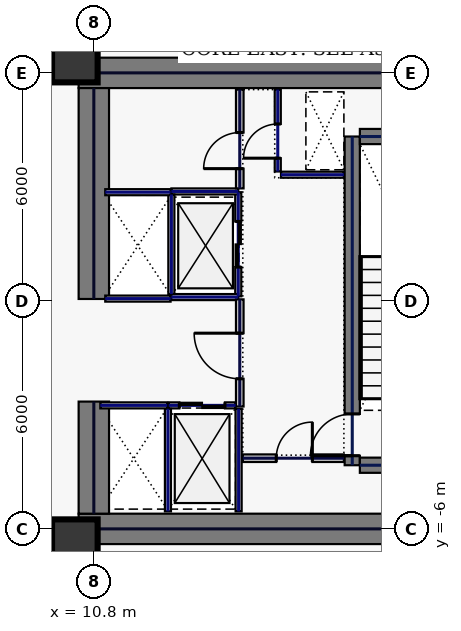
"""IFC4 building model, lengths in metres.
Left out: names, types, materials, properties, quantities, classifications, styles, units other than length and angle.
Written with IfcOpenShell. Run it as: python <this file> out.ifc"""

import sys

from ifc_helpers import new_model, si_unit, direction, frame, frame_2d, origin, origin_2d, place, context, subcontext, project, spatial, rectangle, hollow_rectangle, extrude, element, fill, save


model = new_model("IFC4")
c1 = context("Model", 3, precision=1e-05, world=origin(), true_north=direction((0.0, 1.0)))
c2 = subcontext(c1, "Body", "Model", "MODEL_VIEW")
j1 = project(units=[si_unit("LENGTHUNIT", "METRE"), si_unit("PLANEANGLEUNIT", "RADIAN")], contexts=[c1])
p1 = place(None, origin())
s1 = spatial("IfcSite", under=j1, at=p1, CompositionType="ELEMENT")
p2 = place(p1, origin())
s2 = spatial("IfcBuilding", under=s1, at=p2, CompositionType="ELEMENT")
p3 = place(p2, frame((0.0, 0.0, 55.4)))
s3 = spatial("IfcBuildingStorey", under=s2, at=p3, CompositionType="ELEMENT", Elevation=55.4)
for number, where, z_axis, x_axis in (
    (1, (10.4, 6.0, 0.0), (0.0, 0.0, 1.0), (1.0, 0.0, 0.0)),
    (2, (10.4, -6.0, 0.0), (0.0, 0.0, 1.0), (1.0, 0.0, 0.0)),
):
    element("IfcWall", number, at=place(p3, frame(where, z_axis=z_axis, x_axis=x_axis)), inside=s3, PredefinedType="SHEAR", context=c2, shape_type="SweptSolid", body=[
        extrude(rectangle(XDim=11.6, YDim=0.8, at=frame_2d((5.8, 0.0))), origin(), (0.0, 0.0, 1.0), 3.74),
    ])
p4 = place(p3, frame((10.8, -5.6, 0.0), z_axis=(0.0, 0.0, 1.0), x_axis=(0.0, 1.0, 0.0)))
e3 = element("IfcWall", 3, at=p4, inside=s3, PredefinedType="SHEAR", context=c2, shape_type="SweptSolid", body=[
    extrude(rectangle(XDim=2.95, YDim=0.8, at=frame_2d((1.475, 0.0))), origin(), (0.0, 0.0, 1.0), 3.74),
])
p5 = place(p3, frame((10.8, 0.05, 0.0), z_axis=(0.0, 0.0, 1.0), x_axis=(0.0, 1.0, 0.0)))
e4 = element("IfcWall", 4, at=p5, inside=s3, PredefinedType="SHEAR", context=c2, shape_type="SweptSolid", body=[
    extrude(rectangle(XDim=5.55, YDim=0.8, at=frame_2d((2.775, 0.0))), origin(), (0.0, 0.0, 1.0), 3.74),
])
p6 = place(p3, frame((17.6, -4.325, 0.0), z_axis=(0.0, 0.0, 1.0), x_axis=(0.0, 1.0, 0.0)))
e5 = element("IfcWall", 5, at=p6, inside=s3, PredefinedType="SHEAR", context=c2, shape_type="SweptSolid", body=[
    extrude(rectangle(XDim=8.65, YDim=0.4, at=frame_2d((4.325, 0.0))), origin(), (0.0, 0.0, 1.0), 3.74),
])
p7 = place(p6, frame((0.25, 0.0, 0.0)))
e6 = element("IfcOpeningElement", 6, at=p7, cuts=e5, PredefinedType="OPENING", context=c2, shape_type="SweptSolid", body=[
    extrude(rectangle(XDim=1.1, YDim=2.2, at=frame_2d((0.55, 1.1))), frame((0.0, 0.21, 0.0), z_axis=(0.0, -1.0, 0.0), x_axis=(1.0, 0.0, 0.0)), (0.0, 0.0, 1.0), 0.42),
])
for number, where, z_axis, x_axis in (
    (7, (17.8, -4.325, 0.0), (0.0, 0.0, 1.0), (1.0, 0.0, 0.0)),
    (8, (17.8, 4.325, 0.0), (0.0, 0.0, 1.0), (1.0, 0.0, 0.0)),
):
    element("IfcWall", number, at=place(p3, frame(where, z_axis=z_axis, x_axis=x_axis)), inside=s3, PredefinedType="SHEAR", context=c2, shape_type="SweptSolid", body=[
        extrude(rectangle(XDim=3.4, YDim=0.4, at=frame_2d((1.7, 0.0))), origin(), (0.0, 0.0, 1.0), 3.74),
    ])
for number, where, z_axis, x_axis in (
    (9, (10.3, -6.35, 0.0), (0.0, 0.0, 1.0), (1.0, 0.0, 0.0)),
    (10, (10.3, 6.35, 0.0), (0.0, 0.0, 1.0), (1.0, 0.0, 0.0)),
):
    element("IfcColumn", number, at=place(p3, frame(where, z_axis=z_axis, x_axis=x_axis)), inside=s3, PredefinedType="COLUMN", context=c2, shape_type="SweptSolid", body=[
        extrude(hollow_rectangle(XDim=1.2, YDim=1.2, WallThickness=0.05, at=origin_2d()), origin(), (0.0, 0.0, 1.0), 3.74),
    ])
p8 = place(p3, frame((14.6, 0.12, 0.0), z_axis=(0.0, 0.0, 1.0), x_axis=(0.0, 1.0, 0.0)))
e11 = element("IfcWall", 11, at=p8, inside=s3, PredefinedType="PARTITIONING", context=c2, shape_type="SweptSolid", body=[
    extrude(rectangle(XDim=2.74, YDim=0.16, at=frame_2d((1.37, 0.0))), origin(), (0.0, 0.0, 1.0), 3.74),
])
p9 = place(p8, frame((0.77, 0.0, 0.0)))
e12 = element("IfcOpeningElement", 12, at=p9, cuts=e11, PredefinedType="OPENING", context=c2, shape_type="SweptSolid", body=[
    extrude(rectangle(XDim=1.2, YDim=2.2, at=frame_2d((0.6, 1.1))), frame((0.0, 0.09, 0.0), z_axis=(0.0, -1.0, 0.0), x_axis=(1.0, 0.0, 0.0)), (0.0, 0.0, 1.0), 0.18),
])
for number, where, z_axis, x_axis in (
    (13, (12.84, 0.1, 0.0), (0.0, 0.0, 1.0), (1.0, 0.0, 0.0)),
    (14, (12.84, 2.88, 0.0), (0.0, 0.0, 1.0), (1.0, 0.0, 0.0)),
):
    element("IfcWall", number, at=place(p3, frame(where, z_axis=z_axis, x_axis=x_axis)), inside=s3, PredefinedType="PARTITIONING", context=c2, shape_type="SweptSolid", body=[
        extrude(rectangle(XDim=1.76, YDim=0.16, at=frame_2d((0.88, 0.0))), origin(), (0.0, 0.0, 1.0), 3.74),
    ])
p10 = place(p3, frame((12.84, 0.18, 0.0), z_axis=(0.0, 0.0, 1.0), x_axis=(0.0, 1.0, 0.0)))
e15 = element("IfcWall", 15, at=p10, inside=s3, PredefinedType="PARTITIONING", context=c2, shape_type="SweptSolid", body=[
    extrude(rectangle(XDim=2.62, YDim=0.16, at=frame_2d((1.31, 0.0))), origin(), (0.0, 0.0, 1.0), 3.74),
])
p11 = place(p3, frame((12.77, -2.75, 0.0), z_axis=(0.0, 0.0, 1.0), x_axis=(1.0, 0.0, 0.0)))
e16 = element("IfcWall", 16, at=p11, inside=s3, PredefinedType="PARTITIONING", context=c2, shape_type="SweptSolid", body=[
    extrude(rectangle(XDim=1.76, YDim=0.16, at=frame_2d((0.88, 0.0))), origin(), (0.0, 0.0, 1.0), 3.74),
])
p12 = place(p11, frame((0.28, 0.0, 0.0)))
e17 = element("IfcOpeningElement", 17, at=p12, cuts=e16, PredefinedType="OPENING", context=c2, shape_type="SweptSolid", body=[
    extrude(rectangle(XDim=1.2, YDim=2.2, at=frame_2d((0.6, 1.1))), frame((0.0, 0.09, 0.0), z_axis=(0.0, -1.0, 0.0), x_axis=(1.0, 0.0, 0.0)), (0.0, 0.0, 1.0), 0.18),
])
for number, where, z_axis, x_axis in (
    (18, (12.75, -5.54, 0.0), (0.0, 0.0, 1.0), (0.0, 1.0, 0.0)),
    (19, (14.61, -5.54, 0.0), (0.0, 0.0, 1.0), (0.0, 1.0, 0.0)),
):
    element("IfcWall", number, at=place(p3, frame(where, z_axis=z_axis, x_axis=x_axis)), inside=s3, PredefinedType="PARTITIONING", context=c2, shape_type="SweptSolid", body=[
        extrude(rectangle(XDim=2.7, YDim=0.16, at=frame_2d((1.35, 0.0))), origin(), (0.0, 0.0, 1.0), 3.74),
    ])
p13 = place(p3, frame((10.97, -2.75, 0.0), z_axis=(0.0, 0.0, 1.0), x_axis=(1.0, 0.0, 0.0)))
e20 = element("IfcWall", 20, at=p13, inside=s3, PredefinedType="PARTITIONING", context=c2, shape_type="SweptSolid", body=[
    extrude(rectangle(XDim=1.76, YDim=0.16, at=frame_2d((0.88, 0.0))), origin(), (0.0, 0.0, 1.0), 3.74),
])
for number, where, z_axis, x_axis in (
    (21, (11.1, 0.06, 0.0), (0.0, 0.0, 1.0), (1.0, 0.0, 0.0)),
    (22, (11.1, 2.86, 0.0), (0.0, 0.0, 1.0), (1.0, 0.0, 0.0)),
):
    element("IfcWall", number, at=place(p3, frame(where, z_axis=z_axis, x_axis=x_axis)), inside=s3, PredefinedType="PARTITIONING", context=c2, shape_type="SweptSolid", body=[
        extrude(rectangle(XDim=1.72, YDim=0.16, at=frame_2d((0.86, 0.0))), origin(), (0.0, 0.0, 1.0), 3.74),
    ])
p14 = place(p3, frame((15.64, 3.405, 0.0), z_axis=(0.0, 0.0, 1.0), x_axis=(0.0, 1.0, 0.0)))
e23 = element("IfcWall", 23, at=p14, inside=s3, PredefinedType="PARTITIONING", context=c2, shape_type="SweptSolid", body=[
    extrude(rectangle(XDim=2.155, YDim=0.16, at=frame_2d((1.078, 0.0))), origin(), (0.0, 0.0, 1.0), 3.74),
])
p15 = place(p14, frame((0.35, 0.0, 0.0)))
e24 = element("IfcOpeningElement", 24, at=p15, cuts=e23, PredefinedType="OPENING", context=c2, shape_type="SweptSolid", body=[
    extrude(rectangle(XDim=0.9, YDim=2.2, at=frame_2d((0.45, 1.1))), frame((0.0, 0.09, 0.0), z_axis=(0.0, -1.0, 0.0), x_axis=(1.0, 0.0, 0.0)), (0.0, 0.0, 1.0), 0.18),
])
p16 = place(p3, frame((15.725, 3.32, 0.0), z_axis=(0.0, 0.0, 1.0), x_axis=(1.0, 0.0, 0.0)))
e25 = element("IfcWall", 25, at=p16, inside=s3, PredefinedType="PARTITIONING", context=c2, shape_type="SweptSolid", body=[
    extrude(rectangle(XDim=1.655, YDim=0.16, at=frame_2d((0.827, 0.0))), origin(), (0.0, 0.0, 1.0), 3.74),
])
p17 = place(p3, frame((14.72, -4.14, 0.0), z_axis=(0.0, 0.0, 1.0), x_axis=(1.0, 0.0, 0.0)))
e26 = element("IfcWall", 26, at=p17, inside=s3, PredefinedType="SOLIDWALL", context=c2, shape_type="SweptSolid", body=[
    extrude(rectangle(XDim=2.66, YDim=0.2, at=frame_2d((1.33, 0.0))), origin(), (0.0, 0.0, 1.0), 3.74),
])
p18 = place(p17, frame((0.88, 0.0, 0.0)))
e27 = element("IfcOpeningElement", 27, at=p18, cuts=e26, PredefinedType="OPENING", context=c2, shape_type="SweptSolid", body=[
    extrude(rectangle(XDim=0.95, YDim=2.2, at=frame_2d((0.475, 1.1))), frame((0.0, 0.11, 0.0), z_axis=(0.0, -1.0, 0.0), x_axis=(1.0, 0.0, 0.0)), (0.0, 0.0, 1.0), 0.22),
])
p19 = place(p3, frame((14.64, 2.96, 0.0), z_axis=(0.0, 0.0, 1.0), x_axis=(0.0, 1.0, 0.0)))
e28 = element("IfcWall", 28, at=p19, inside=s3, PredefinedType="SOLIDWALL", context=c2, shape_type="SweptSolid", body=[
    extrude(rectangle(XDim=2.6, YDim=0.2, at=frame_2d((1.3, 0.0))), origin(), (0.0, 0.0, 1.0), 3.74),
])
p20 = place(p19, frame((0.52, 0.0, 0.0)))
e29 = element("IfcOpeningElement", 29, at=p20, cuts=e28, PredefinedType="OPENING", context=c2, shape_type="SweptSolid", body=[
    extrude(rectangle(XDim=0.95, YDim=2.2, at=frame_2d((0.475, 1.1))), frame((0.0, 0.11, 0.0), z_axis=(0.0, -1.0, 0.0), x_axis=(1.0, 0.0, 0.0)), (0.0, 0.0, 1.0), 0.22),
])
p21 = place(p3, frame((14.64, -2.78, 0.0), z_axis=(0.0, 0.0, 1.0), x_axis=(0.0, 1.0, 0.0)))
e30 = element("IfcWall", 30, at=p21, inside=s3, PredefinedType="SOLIDWALL", context=c2, shape_type="SweptSolid", body=[
    extrude(rectangle(XDim=2.82, YDim=0.2, at=frame_2d((1.41, 0.0))), origin(), (0.0, 0.0, 1.0), 3.74),
])
p22 = place(p21, frame((0.73, 0.0, 0.0)))
e31 = element("IfcOpeningElement", 31, at=p22, cuts=e30, PredefinedType="OPENING", context=c2, shape_type="SweptSolid", body=[
    extrude(rectangle(XDim=1.2, YDim=2.2, at=frame_2d((0.6, 1.1))), frame((0.0, 0.11, 0.0), z_axis=(0.0, -1.0, 0.0), x_axis=(1.0, 0.0, 0.0)), (0.0, 0.0, 1.0), 0.22),
])
p23 = place(p3, frame((10.58, 7.185, 0.0), z_axis=(0.0, 0.0, 1.0), x_axis=(0.0, -1.0, 0.0)))
e32 = element("IfcWall", 32, at=p23, inside=s3, PredefinedType="PARTITIONING", context=c2, shape_type="SweptSolid", body=[
    extrude(rectangle(XDim=0.765, YDim=0.16, at=frame_2d((0.383, 0.0))), origin(), (0.0, 0.0, 1.0), 3.74),
])
p24 = place(p3, frame((10.58, -6.42, 0.0), z_axis=(0.0, 0.0, 1.0), x_axis=(0.0, -1.0, 0.0)))
e33 = element("IfcWall", 33, at=p24, inside=s3, PredefinedType="PARTITIONING", context=c2, shape_type="SweptSolid", body=[
    extrude(rectangle(XDim=0.565, YDim=0.16, at=frame_2d((0.283, 0.0))), origin(), (0.0, 0.0, 1.0), 3.74),
])
p25 = place(p7, origin())
e34 = element("IfcDoor", 34, at=p25, inside=s3, OperationType="SINGLE_SWING_LEFT", PredefinedType="DOOR", context=c2, shape_type="SweptSolid", body=[
    extrude(rectangle(XDim=1.1, YDim=2.2, at=frame_2d((0.55, 1.1))), frame((0.0, 0.025, 0.0), z_axis=(0.0, -1.0, 0.0), x_axis=(1.0, 0.0, 0.0)), (0.0, 0.0, 1.0), 0.05),
])
fill(e6, e34)
p26 = place(p9, origin())
e35 = element("IfcDoor", 35, at=p26, inside=s3, OperationType="SLIDING_TO_LEFT", PredefinedType="DOOR", context=c2, shape_type="SweptSolid", body=[
    extrude(rectangle(XDim=1.2, YDim=2.2, at=frame_2d((0.6, 1.1))), frame((0.0, 0.025, 0.0), z_axis=(0.0, -1.0, 0.0), x_axis=(1.0, 0.0, 0.0)), (0.0, 0.0, 1.0), 0.05),
])
fill(e12, e35)
p27 = place(p12, origin())
e36 = element("IfcDoor", 36, at=p27, inside=s3, OperationType="SLIDING_TO_LEFT", PredefinedType="DOOR", context=c2, shape_type="SweptSolid", body=[
    extrude(rectangle(XDim=1.2, YDim=2.2, at=frame_2d((0.6, 1.1))), frame((0.0, 0.025, 0.0), z_axis=(0.0, -1.0, 0.0), x_axis=(1.0, 0.0, 0.0)), (0.0, 0.0, 1.0), 0.05),
])
fill(e17, e36)
p28 = place(p15, origin())
e37 = element("IfcDoor", 37, at=p28, inside=s3, OperationType="SINGLE_SWING_LEFT", PredefinedType="DOOR", context=c2, shape_type="SweptSolid", body=[
    extrude(rectangle(XDim=0.9, YDim=2.2, at=frame_2d((0.45, 1.1))), frame((0.0, 0.025, 0.0), z_axis=(0.0, -1.0, 0.0), x_axis=(1.0, 0.0, 0.0)), (0.0, 0.0, 1.0), 0.05),
])
fill(e24, e37)
p29 = place(p18, origin())
e38 = element("IfcDoor", 38, at=p29, inside=s3, OperationType="SINGLE_SWING_RIGHT", PredefinedType="DOOR", context=c2, shape_type="SweptSolid", body=[
    extrude(rectangle(XDim=0.95, YDim=2.2, at=frame_2d((0.475, 1.1))), frame((0.0, 0.025, 0.0), z_axis=(0.0, -1.0, 0.0), x_axis=(1.0, 0.0, 0.0)), (0.0, 0.0, 1.0), 0.05),
])
fill(e27, e38)
p30 = place(p20, origin())
e39 = element("IfcDoor", 39, at=p30, inside=s3, OperationType="SINGLE_SWING_LEFT", PredefinedType="DOOR", context=c2, shape_type="SweptSolid", body=[
    extrude(rectangle(XDim=0.95, YDim=2.2, at=frame_2d((0.475, 1.1))), frame((0.0, 0.025, 0.0), z_axis=(0.0, -1.0, 0.0), x_axis=(1.0, 0.0, 0.0)), (0.0, 0.0, 1.0), 0.05),
])
fill(e29, e39)
p31 = place(p22, origin())
e40 = element("IfcDoor", 40, at=p31, inside=s3, OperationType="SINGLE_SWING_RIGHT", PredefinedType="DOOR", context=c2, shape_type="SweptSolid", body=[
    extrude(rectangle(XDim=1.2, YDim=2.2, at=frame_2d((0.6, 1.1))), frame((0.0, 0.025, 0.0), z_axis=(0.0, -1.0, 0.0), x_axis=(1.0, 0.0, 0.0)), (0.0, 0.0, 1.0), 0.05),
])
fill(e31, e40)
save(model, sys.argv[1])
